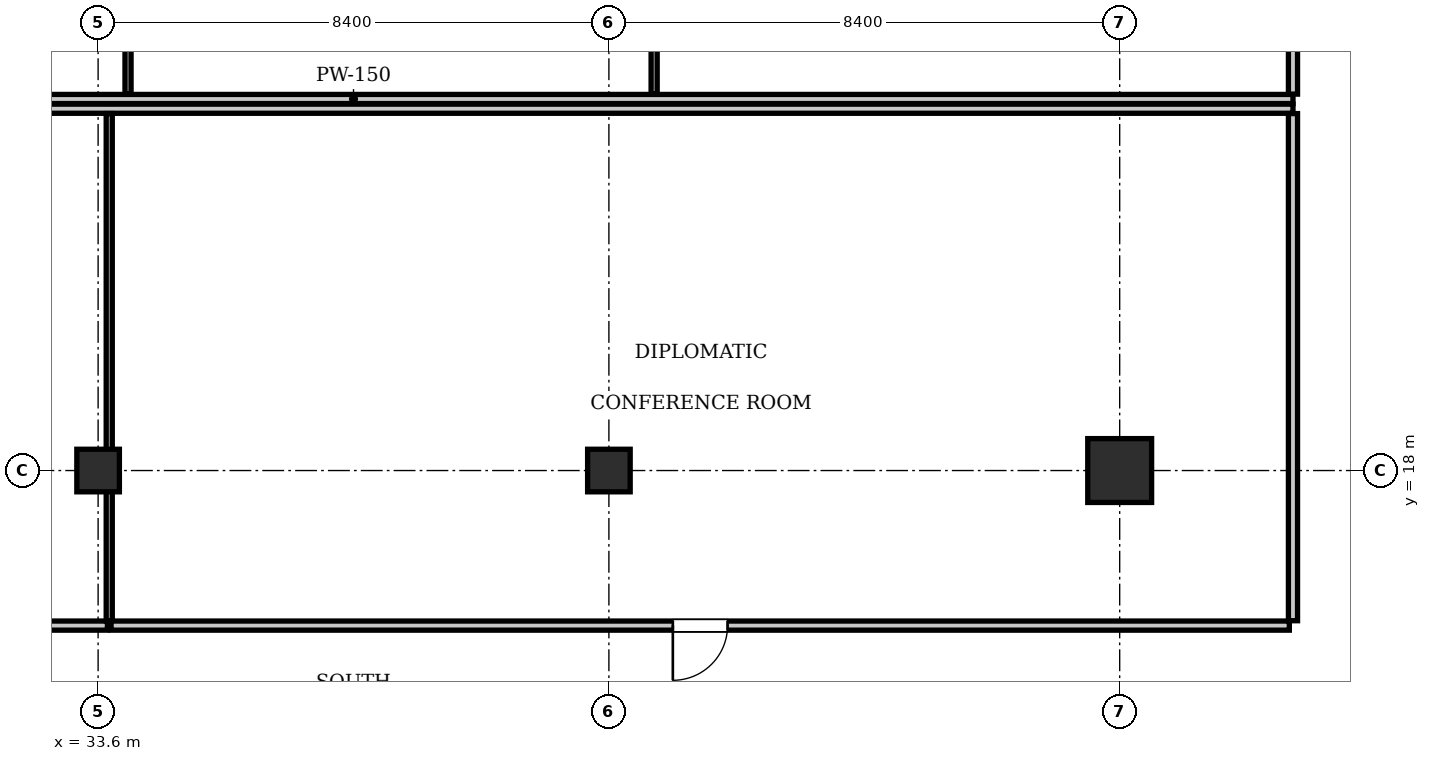
"""IFC4 building model, lengths in metres.
Left out: names, types, materials, properties, quantities, classifications, styles, units other than length and angle.
Written with IfcOpenShell. Run it as: python <this file> out.ifc"""

import sys

from ifc_helpers import new_model, si_unit, direction, frame, frame_2d, origin, origin_2d, place, context, subcontext, project, spatial, rectangle, i_section, extrude, element, fill, save


model = new_model("IFC4")
c1 = context("Model", 3, precision=1e-05, world=origin(), true_north=direction((0.0, 1.0)))
c2 = subcontext(c1, "Body", "Model", "MODEL_VIEW")
j1 = project(units=[si_unit("LENGTHUNIT", "METRE"), si_unit("PLANEANGLEUNIT", "RADIAN")], contexts=[c1])
p1 = place(None, origin())
s1 = spatial("IfcSite", under=j1, at=p1, CompositionType="ELEMENT")
p2 = place(p1, origin())
s2 = spatial("IfcBuilding", under=s1, at=p2, CompositionType="ELEMENT")
p3 = place(p2, frame((0.0, 0.0, 69.3)))
s3 = spatial("IfcBuildingStorey", under=s2, at=p3, CompositionType="ELEMENT", Elevation=69.3)
p4 = place(p3, frame((50.4, 18.0, 0.0), z_axis=(0.0, 0.0, 1.0), x_axis=(1.0, 0.0, 0.0)))
e1 = element("IfcColumn", 1, at=p4, inside=s3, PredefinedType="COLUMN", context=c2, shape_type="SweptSolid", body=[
    extrude(rectangle(XDim=1.05, YDim=1.05, at=origin_2d()), origin(), (0.0, 0.0, 1.0), 3.85),
])
for number, where, z_axis, x_axis in (
    (2, (33.6, 18.0, 0.0), (0.0, 0.0, 1.0), (1.0, 0.0, 0.0)),
    (3, (42.0, 18.0, 0.0), (0.0, 0.0, 1.0), (1.0, 0.0, 0.0)),
):
    element("IfcColumn", number, at=place(p3, frame(where, z_axis=z_axis, x_axis=x_axis)), inside=s3, PredefinedType="COLUMN", context=c2, shape_type="SweptSolid", body=[
        extrude(i_section(OverallWidth=0.7, OverallDepth=0.7, WebThickness=0.028, FlangeThickness=0.044, at=origin_2d()), origin(), (0.0, 0.0, 1.0), 3.85),
    ])
p5 = place(p3, frame((22.35, 24.11, 0.0), z_axis=(0.0, 0.0, 1.0), x_axis=(1.0, 0.0, 0.0)))
e4 = element("IfcWall", 4, at=p5, inside=s3, PredefinedType="PARTITIONING", context=c2, shape_type="SweptSolid", body=[
    extrude(rectangle(XDim=30.9, YDim=0.15, at=frame_2d((15.45, 0.0))), origin(), (0.0, 0.0, 1.0), 3.61),
])
p6 = place(p3, frame((53.25, 24.19, 0.0), z_axis=(0.0, 0.0, 1.0), x_axis=(0.0, 1.0, 0.0)))
e5 = element("IfcWall", 5, at=p6, inside=s3, PredefinedType="PARTITIONING", context=c2, shape_type="SweptSolid", body=[
    extrude(rectangle(XDim=8.33, YDim=0.15, at=frame_2d((4.165, 0.0))), origin(), (0.0, 0.0, 1.0), 3.61),
])
for number, where, z_axis, x_axis in (
    (6, (34.092, 24.19, 0.0), (0.0, 0.0, 1.0), (0.0, 1.0, 0.0)),
    (7, (42.744, 24.19, 0.0), (0.0, 0.0, 1.0), (0.0, 1.0, 0.0)),
):
    element("IfcWall", number, at=place(p3, frame(where, z_axis=z_axis, x_axis=x_axis)), inside=s3, PredefinedType="PARTITIONING", context=c2, shape_type="SweptSolid", body=[
        extrude(rectangle(XDim=8.33, YDim=0.1, at=frame_2d((4.165, 0.0))), origin(), (0.0, 0.0, 1.0), 3.61),
    ])
p7 = place(p3, frame((22.35, 23.95, 0.0), z_axis=(0.0, 0.0, 1.0), x_axis=(1.0, 0.0, 0.0)))
e8 = element("IfcWall", 8, at=p7, inside=s3, PredefinedType="PARTITIONING", context=c2, shape_type="SweptSolid", body=[
    extrude(rectangle(XDim=30.9, YDim=0.15, at=frame_2d((15.45, 0.0))), origin(), (0.0, 0.0, 1.0), 3.61),
])
p8 = place(p3, frame((53.25, 15.53, 0.0), z_axis=(0.0, 0.0, 1.0), x_axis=(0.0, 1.0, 0.0)))
e9 = element("IfcWall", 9, at=p8, inside=s3, PredefinedType="PARTITIONING", context=c2, shape_type="SweptSolid", body=[
    extrude(rectangle(XDim=8.34, YDim=0.15, at=frame_2d((4.17, 0.0))), origin(), (0.0, 0.0, 1.0), 3.61),
])
p9 = place(p3, frame((22.41, 15.45, 0.0), z_axis=(0.0, 0.0, 1.0), x_axis=(1.0, 0.0, 0.0)))
e10 = element("IfcWall", 10, at=p9, inside=s3, PredefinedType="PARTITIONING", context=c2, shape_type="SweptSolid", body=[
    extrude(rectangle(XDim=11.343, YDim=0.15, at=frame_2d((5.671, 0.0))), origin(), (0.0, 0.0, 1.0), 3.61),
])
p10 = place(p9, frame((5.221, 0.0, 0.0)))
e11 = element("IfcOpeningElement", 11, at=p10, cuts=e10, PredefinedType="OPENING", context=c2, shape_type="SweptSolid", body=[
    extrude(rectangle(XDim=0.9, YDim=2.1, at=frame_2d((0.45, 1.05))), frame((0.0, 0.085, 0.0), z_axis=(0.0, -1.0, 0.0), x_axis=(1.0, 0.0, 0.0)), (0.0, 0.0, 1.0), 0.17),
])
p11 = place(p3, frame((33.783, 15.53, 0.0), z_axis=(0.0, 0.0, 1.0), x_axis=(0.0, 1.0, 0.0)))
e12 = element("IfcWall", 12, at=p11, inside=s3, PredefinedType="PARTITIONING", context=c2, shape_type="SweptSolid", body=[
    extrude(rectangle(XDim=8.34, YDim=0.1, at=frame_2d((4.17, 0.0))), origin(), (0.0, 0.0, 1.0), 2.988),
])
p12 = place(p3, frame((33.813, 15.45, 0.0), z_axis=(0.0, 0.0, 1.0), x_axis=(1.0, 0.0, 0.0)))
e13 = element("IfcWall", 13, at=p12, inside=s3, PredefinedType="PARTITIONING", context=c2, shape_type="SweptSolid", body=[
    extrude(rectangle(XDim=19.377, YDim=0.15, at=frame_2d((9.688, 0.0))), origin(), (0.0, 0.0, 1.0), 3.61),
])
p13 = place(p12, frame((9.239, 0.0, 0.0)))
e14 = element("IfcOpeningElement", 14, at=p13, cuts=e13, PredefinedType="OPENING", context=c2, shape_type="SweptSolid", body=[
    extrude(rectangle(XDim=0.9, YDim=2.1, at=frame_2d((0.45, 1.05))), frame((0.0, 0.085, 0.0), z_axis=(0.0, -1.0, 0.0), x_axis=(1.0, 0.0, 0.0)), (0.0, 0.0, 1.0), 0.17),
])
p14 = place(p13, frame((0.9, 0.0, 0.0), z_axis=(0.0, 0.0, 1.0), x_axis=(-1.0, 0.0, 0.0)))
e15 = element("IfcDoor", 15, at=p14, inside=s3, OperationType="SINGLE_SWING_RIGHT", PredefinedType="DOOR", context=c2, shape_type="SweptSolid", body=[
    extrude(rectangle(XDim=0.9, YDim=2.1, at=frame_2d((0.45, 1.05))), frame((0.0, 0.025, 0.0), z_axis=(0.0, -1.0, 0.0), x_axis=(1.0, 0.0, 0.0)), (0.0, 0.0, 1.0), 0.05),
])
fill(e14, e15)
save(model, sys.argv[1])
